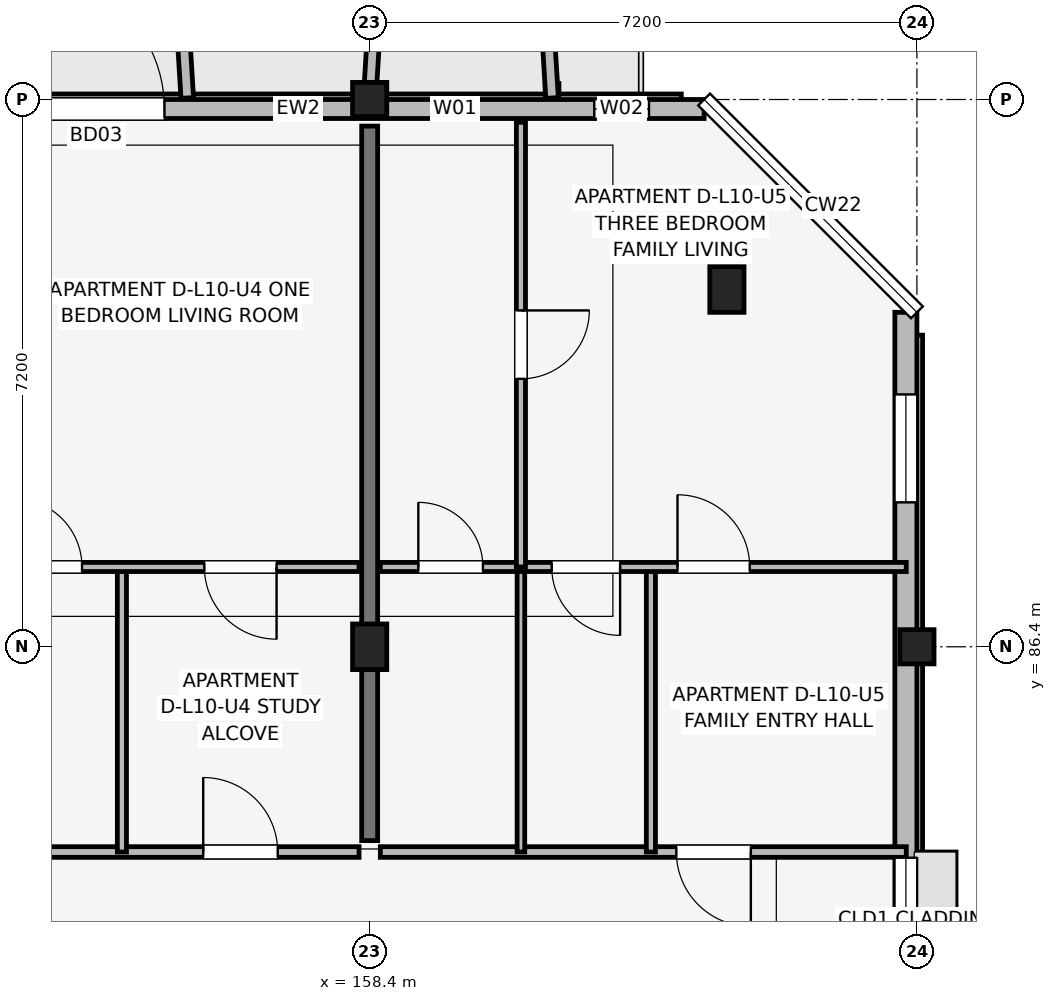
"""IFC4 building model, lengths in metres.
Left out: names, types, materials, properties, quantities, classifications, styles, units other than length and angle.
Written with IfcOpenShell. Run it as: python <this file> out.ifc"""

import sys

from ifc_helpers import new_model, si_unit, direction, frame, frame_2d, origin, origin_2d, place, context, subcontext, project, spatial, rectangle, extrude, element, fill, save


model = new_model("IFC4")
c1 = context("Model", 3, precision=1e-05, world=origin(), true_north=direction((0.0, 1.0)))
c2 = subcontext(c1, "Body", "Model", "MODEL_VIEW")
j1 = project(units=[si_unit("LENGTHUNIT", "METRE"), si_unit("PLANEANGLEUNIT", "RADIAN")], contexts=[c1])
p1 = place(None, origin())
s1 = spatial("IfcSite", under=j1, at=p1, CompositionType="ELEMENT")
p2 = place(p1, origin())
s2 = spatial("IfcBuilding", under=s1, at=p2, CompositionType="ELEMENT")
p3 = place(p2, frame((0.0, 0.0, 33.9)))
s3 = spatial("IfcBuildingStorey", under=s2, at=p3, CompositionType="ELEMENT", Elevation=33.9)
p4 = place(p3, frame((158.4, 86.4, 0.0), z_axis=(0.0, 0.0, 1.0), x_axis=(1.0, 0.0, 0.0)))
e1 = element("IfcColumn", 1, at=p4, inside=s3, PredefinedType="COLUMN", context=c2, shape_type="SweptSolid", body=[
    extrude(rectangle(XDim=0.45, YDim=0.6, at=origin_2d()), origin(), (0.0, 0.0, 1.0), 3.15),
])
for number, where, z_axis, x_axis in (
    (2, (158.4, 93.6, 0.0), (0.0, 0.0, 1.0), (1.0, 0.0, 0.0)),
    (3, (165.6, 86.4, 0.0), (0.0, 0.0, 1.0), (1.0, 0.0, 0.0)),
):
    element("IfcColumn", number, at=place(p3, frame(where, z_axis=z_axis, x_axis=x_axis)), inside=s3, PredefinedType="COLUMN", context=c2, shape_type="SweptSolid", body=[
        extrude(rectangle(XDim=0.45, YDim=0.45, at=origin_2d()), origin(), (0.0, 0.0, 1.0), 3.15),
    ])
p5 = place(p3, frame((163.1, 91.1, 0.0), z_axis=(0.0, 0.0, 1.0), x_axis=(1.0, 0.0, 0.0)))
e4 = element("IfcColumn", 4, at=p5, inside=s3, PredefinedType="COLUMN", context=c2, shape_type="SweptSolid", body=[
    extrude(rectangle(XDim=0.45, YDim=0.6, at=origin_2d()), origin(), (0.0, 0.0, 1.0), 3.15),
])
p6 = place(p3, frame((158.4, 83.85, 0.0), z_axis=(0.0, 0.0, 1.0), x_axis=(0.0, 1.0, 0.0)))
e5 = element("IfcWall", 5, at=p6, inside=s3, PredefinedType="SHEAR", context=c2, shape_type="SweptSolid", body=[
    extrude(rectangle(XDim=9.4, YDim=0.21, at=frame_2d((4.7, 0.0))), origin(), (0.0, 0.0, 1.0), 3.15),
])
p7 = place(p3, frame((165.455, 74.8, 0.0), z_axis=(0.0, 0.0, 1.0), x_axis=(0.0, 1.0, 0.0)))
e6 = element("IfcWall", 6, at=p7, inside=s3, PredefinedType="SOLIDWALL", context=c2, shape_type="SweptSolid", body=[
    extrude(rectangle(XDim=16.0, YDim=0.29, at=frame_2d((8.0, 0.0))), origin(), (0.0, 0.0, 1.0), 2.48),
])
p8 = place(p7, frame((7.175, 0.0, 1.05)))
e7 = element("IfcOpeningElement", 7, at=p8, cuts=e6, PredefinedType="OPENING", context=c2, shape_type="SweptSolid", body=[
    extrude(rectangle(XDim=1.65, YDim=1.15, at=frame_2d((0.825, 0.575))), frame((0.0, 0.155, 0.0), z_axis=(0.0, -1.0, 0.0), x_axis=(1.0, 0.0, 0.0)), (0.0, 0.0, 1.0), 0.31),
])
p9 = place(p7, frame((13.5, 0.0, 0.75)))
e8 = element("IfcOpeningElement", 8, at=p9, cuts=e6, PredefinedType="OPENING", context=c2, shape_type="SweptSolid", body=[
    extrude(rectangle(XDim=1.42, YDim=1.6, at=frame_2d((0.71, 0.8))), frame((0.0, 0.155, 0.0), z_axis=(0.0, -1.0, 0.0), x_axis=(1.0, 0.0, 0.0)), (0.0, 0.0, 1.0), 0.31),
])
p10 = place(p3, frame((162.8, 93.475, 0.0), z_axis=(0.0, 0.0, 1.0), x_axis=(-1.0, 0.0, 0.0)))
e9 = element("IfcWall", 9, at=p10, inside=s3, PredefinedType="SOLIDWALL", context=c2, shape_type="SweptSolid", body=[
    extrude(rectangle(XDim=30.4, YDim=0.25, at=frame_2d((15.2, 0.0))), origin(), (0.0, 0.0, 1.0), 2.45),
])
p11 = place(p10, frame((23.15, 0.0, 0.0), z_axis=(0.0, 0.0, 1.0), x_axis=(-1.0, 0.0, 0.0)))
e10 = element("IfcOpeningElement", 10, at=p11, cuts=e9, PredefinedType="OPENING", context=c2, shape_type="SweptSolid", body=[
    extrude(rectangle(XDim=1.5, YDim=2.15, at=frame_2d((0.75, 1.075))), frame((0.0, 0.135, 0.0), z_axis=(0.0, -1.0, 0.0), x_axis=(1.0, 0.0, 0.0)), (0.0, 0.0, 1.0), 0.27),
])
p12 = place(p10, frame((8.9, 0.0, 0.0), z_axis=(0.0, 0.0, 1.0), x_axis=(-1.0, 0.0, 0.0)))
e11 = element("IfcOpeningElement", 11, at=p12, cuts=e9, PredefinedType="OPENING", context=c2, shape_type="SweptSolid", body=[
    extrude(rectangle(XDim=1.8, YDim=2.15, at=frame_2d((0.9, 1.075))), frame((0.0, 0.135, 0.0), z_axis=(0.0, -1.0, 0.0), x_axis=(1.0, 0.0, 0.0)), (0.0, 0.0, 1.0), 0.27),
])
p13 = place(p10, frame((26.403, 0.0, 0.7)))
e12 = element("IfcOpeningElement", 12, at=p13, cuts=e9, PredefinedType="OPENING", context=c2, shape_type="SweptSolid", body=[
    extrude(rectangle(XDim=1.86, YDim=1.6, at=frame_2d((0.93, 0.8))), frame((0.0, 0.135, 0.0), z_axis=(0.0, -1.0, 0.0), x_axis=(1.0, 0.0, 0.0)), (0.0, 0.0, 1.0), 0.27),
])
p14 = place(p10, frame((16.538, 0.0, 0.7)))
e13 = element("IfcOpeningElement", 13, at=p14, cuts=e9, PredefinedType="OPENING", context=c2, shape_type="SweptSolid", body=[
    extrude(rectangle(XDim=1.86, YDim=1.6, at=frame_2d((0.93, 0.8))), frame((0.0, 0.135, 0.0), z_axis=(0.0, -1.0, 0.0), x_axis=(1.0, 0.0, 0.0)), (0.0, 0.0, 1.0), 0.27),
])
p15 = place(p10, frame((12.262, 0.0, 0.75)))
e14 = element("IfcOpeningElement", 14, at=p15, cuts=e9, PredefinedType="OPENING", context=c2, shape_type="SweptSolid", body=[
    extrude(rectangle(XDim=1.34, YDim=1.55, at=frame_2d((0.67, 0.775))), frame((0.0, 0.135, 0.0), z_axis=(0.0, -1.0, 0.0), x_axis=(1.0, 0.0, 0.0)), (0.0, 0.0, 1.0), 0.27),
])
p16 = place(p10, frame((9.748, 0.0, 0.75)))
e15 = element("IfcOpeningElement", 15, at=p16, cuts=e9, PredefinedType="OPENING", context=c2, shape_type="SweptSolid", body=[
    extrude(rectangle(XDim=1.46, YDim=1.55, at=frame_2d((0.73, 0.775))), frame((0.0, 0.135, 0.0), z_axis=(0.0, -1.0, 0.0), x_axis=(1.0, 0.0, 0.0)), (0.0, 0.0, 1.0), 0.27),
])
p17 = place(p10, frame((2.978, 0.0, 0.75)))
e16 = element("IfcOpeningElement", 16, at=p17, cuts=e9, PredefinedType="OPENING", context=c2, shape_type="SweptSolid", body=[
    extrude(rectangle(XDim=0.6, YDim=1.25, at=frame_2d((0.3, 0.625))), frame((0.0, 0.135, 0.0), z_axis=(0.0, -1.0, 0.0), x_axis=(1.0, 0.0, 0.0)), (0.0, 0.0, 1.0), 0.27),
])
p18 = place(p10, frame((0.725, 0.0, 0.75)))
e17 = element("IfcOpeningElement", 17, at=p18, cuts=e9, PredefinedType="OPENING", context=c2, shape_type="SweptSolid", body=[
    extrude(rectangle(XDim=0.72, YDim=1.35, at=frame_2d((0.36, 0.675))), frame((0.0, 0.135, 0.0), z_axis=(0.0, -1.0, 0.0), x_axis=(1.0, 0.0, 0.0)), (0.0, 0.0, 1.0), 0.27),
])
p19 = place(p3, frame((156.0, 93.62, 0.0), z_axis=(0.0, 0.0, 1.0), x_axis=(-0.061170732449, 0.998127317276, 0.0)))
e18 = element("IfcWall", 18, at=p19, inside=s3, PredefinedType="ELEMENTEDWALL", context=c2, shape_type="SweptSolid", body=[
    extrude(rectangle(XDim=1.964, YDim=0.165, at=frame_2d((0.982, 0.0))), origin(), (0.0, 0.0, 1.0), 2.45),
])
for number, where, z_axis, x_axis in (
    (19, (158.4, 93.62, 0.0), (0.0, 0.0, 1.0), (0.061, 0.998, 0.0)),
    (20, (160.8, 93.62, 0.0), (0.0, 0.0, 1.0), (-0.061, 0.998, 0.0)),
):
    element("IfcWall", number, at=place(p3, frame(where, z_axis=z_axis, x_axis=x_axis)), inside=s3, PredefinedType="ELEMENTEDWALL", context=c2, shape_type="SweptSolid", body=[
        extrude(rectangle(XDim=1.964, YDim=0.165, at=frame_2d((0.982, 0.0))), origin(), (0.0, 0.0, 1.0), 2.95),
    ])
p20 = place(p3, frame((151.34, 83.7, 0.0), z_axis=(0.0, 0.0, 1.0), x_axis=(1.0, 0.0, 0.0)))
e21 = element("IfcWall", 21, at=p20, inside=s3, PredefinedType="PARTITIONING", context=c2, shape_type="SweptSolid", body=[
    extrude(rectangle(XDim=6.92, YDim=0.14, at=frame_2d((3.46, 0.0))), origin(), (0.0, 0.0, 1.0), 2.38),
])
p21 = place(p20, frame((4.87, 0.0, 0.0)))
e22 = element("IfcOpeningElement", 22, at=p21, cuts=e21, PredefinedType="OPENING", context=c2, shape_type="SweptSolid", body=[
    extrude(rectangle(XDim=0.98, YDim=2.1, at=frame_2d((0.49, 1.05))), frame((0.0, 0.08, 0.0), z_axis=(0.0, -1.0, 0.0), x_axis=(1.0, 0.0, 0.0)), (0.0, 0.0, 1.0), 0.16),
])
p22 = place(p3, frame((155.14, 83.7, 0.0), z_axis=(0.0, 0.0, 1.0), x_axis=(0.0, 1.0, 0.0)))
e23 = element("IfcWall", 23, at=p22, inside=s3, PredefinedType="PARTITIONING", context=c2, shape_type="SweptSolid", body=[
    extrude(rectangle(XDim=3.75, YDim=0.12, at=frame_2d((1.875, 0.0))), origin(), (0.0, 0.0, 1.0), 2.38),
])
p23 = place(p3, frame((151.34, 87.45, 0.0), z_axis=(0.0, 0.0, 1.0), x_axis=(1.0, 0.0, 0.0)))
e24 = element("IfcWall", 24, at=p23, inside=s3, PredefinedType="PARTITIONING", context=c2, shape_type="SweptSolid", body=[
    extrude(rectangle(XDim=6.92, YDim=0.12, at=frame_2d((3.46, 0.0))), origin(), (0.0, 0.0, 1.0), 2.38),
])
p24 = place(p23, frame((1.35, 0.0, 0.0), z_axis=(0.0, 0.0, 1.0), x_axis=(-1.0, 0.0, 0.0)))
e25 = element("IfcOpeningElement", 25, at=p24, cuts=e24, PredefinedType="OPENING", context=c2, shape_type="SweptSolid", body=[
    extrude(rectangle(XDim=0.85, YDim=2.08, at=frame_2d((0.425, 1.04))), frame((0.0, 0.07, 0.0), z_axis=(0.0, -1.0, 0.0), x_axis=(1.0, 0.0, 0.0)), (0.0, 0.0, 1.0), 0.14),
])
p25 = place(p23, frame((2.375, 0.0, 0.0)))
e26 = element("IfcOpeningElement", 26, at=p25, cuts=e24, PredefinedType="OPENING", context=c2, shape_type="SweptSolid", body=[
    extrude(rectangle(XDim=0.9, YDim=2.08, at=frame_2d((0.45, 1.04))), frame((0.0, 0.07, 0.0), z_axis=(0.0, -1.0, 0.0), x_axis=(1.0, 0.0, 0.0)), (0.0, 0.0, 1.0), 0.14),
])
p26 = place(p23, frame((5.835, 0.0, 0.0), z_axis=(0.0, 0.0, 1.0), x_axis=(-1.0, 0.0, 0.0)))
e27 = element("IfcOpeningElement", 27, at=p26, cuts=e24, PredefinedType="OPENING", context=c2, shape_type="SweptSolid", body=[
    extrude(rectangle(XDim=0.95, YDim=2.08, at=frame_2d((0.475, 1.04))), frame((0.0, 0.07, 0.0), z_axis=(0.0, -1.0, 0.0), x_axis=(1.0, 0.0, 0.0)), (0.0, 0.0, 1.0), 0.14),
])
p27 = place(p3, frame((158.54, 83.7, 0.0), z_axis=(0.0, 0.0, 1.0), x_axis=(1.0, 0.0, 0.0)))
e28 = element("IfcWall", 28, at=p27, inside=s3, PredefinedType="PARTITIONING", context=c2, shape_type="SweptSolid", body=[
    extrude(rectangle(XDim=6.92, YDim=0.14, at=frame_2d((3.46, 0.0))), origin(), (0.0, 0.0, 1.0), 2.38),
])
p28 = place(p27, frame((4.875, 0.0, 0.0), z_axis=(0.0, 0.0, 1.0), x_axis=(-1.0, 0.0, 0.0)))
e29 = element("IfcOpeningElement", 29, at=p28, cuts=e28, PredefinedType="OPENING", context=c2, shape_type="SweptSolid", body=[
    extrude(rectangle(XDim=0.98, YDim=2.1, at=frame_2d((0.49, 1.05))), frame((0.0, 0.08, 0.0), z_axis=(0.0, -1.0, 0.0), x_axis=(1.0, 0.0, 0.0)), (0.0, 0.0, 1.0), 0.16),
])
p29 = place(p3, frame((160.39, 83.7, 0.0), z_axis=(0.0, 0.0, 1.0), x_axis=(0.0, 1.0, 0.0)))
e30 = element("IfcWall", 30, at=p29, inside=s3, PredefinedType="PARTITIONING", context=c2, shape_type="SweptSolid", body=[
    extrude(rectangle(XDim=3.75, YDim=0.1, at=frame_2d((1.875, 0.0))), origin(), (0.0, 0.0, 1.0), 2.38),
])
p30 = place(p3, frame((162.1, 83.7, 0.0), z_axis=(0.0, 0.0, 1.0), x_axis=(0.0, 1.0, 0.0)))
e31 = element("IfcWall", 31, at=p30, inside=s3, PredefinedType="PARTITIONING", context=c2, shape_type="SweptSolid", body=[
    extrude(rectangle(XDim=3.75, YDim=0.12, at=frame_2d((1.875, 0.0))), origin(), (0.0, 0.0, 1.0), 2.38),
])
p31 = place(p3, frame((158.54, 87.45, 0.0), z_axis=(0.0, 0.0, 1.0), x_axis=(1.0, 0.0, 0.0)))
e32 = element("IfcWall", 32, at=p31, inside=s3, PredefinedType="PARTITIONING", context=c2, shape_type="SweptSolid", body=[
    extrude(rectangle(XDim=6.92, YDim=0.12, at=frame_2d((3.46, 0.0))), origin(), (0.0, 0.0, 1.0), 2.38),
])
p32 = place(p31, frame((0.5, 0.0, 0.0)))
e33 = element("IfcOpeningElement", 33, at=p32, cuts=e32, PredefinedType="OPENING", context=c2, shape_type="SweptSolid", body=[
    extrude(rectangle(XDim=0.85, YDim=2.08, at=frame_2d((0.425, 1.04))), frame((0.0, 0.07, 0.0), z_axis=(0.0, -1.0, 0.0), x_axis=(1.0, 0.0, 0.0)), (0.0, 0.0, 1.0), 0.14),
])
p33 = place(p31, frame((3.155, 0.0, 0.0), z_axis=(0.0, 0.0, 1.0), x_axis=(-1.0, 0.0, 0.0)))
e34 = element("IfcOpeningElement", 34, at=p33, cuts=e32, PredefinedType="OPENING", context=c2, shape_type="SweptSolid", body=[
    extrude(rectangle(XDim=0.9, YDim=2.08, at=frame_2d((0.45, 1.04))), frame((0.0, 0.07, 0.0), z_axis=(0.0, -1.0, 0.0), x_axis=(1.0, 0.0, 0.0)), (0.0, 0.0, 1.0), 0.14),
])
p34 = place(p31, frame((3.91, 0.0, 0.0)))
e35 = element("IfcOpeningElement", 35, at=p34, cuts=e32, PredefinedType="OPENING", context=c2, shape_type="SweptSolid", body=[
    extrude(rectangle(XDim=0.95, YDim=2.08, at=frame_2d((0.475, 1.04))), frame((0.0, 0.07, 0.0), z_axis=(0.0, -1.0, 0.0), x_axis=(1.0, 0.0, 0.0)), (0.0, 0.0, 1.0), 0.14),
])
p35 = place(p3, frame((160.39, 87.45, 0.0), z_axis=(0.0, 0.0, 1.0), x_axis=(0.0, 1.0, 0.0)))
e36 = element("IfcWall", 36, at=p35, inside=s3, PredefinedType="PARTITIONING", context=c2, shape_type="SweptSolid", body=[
    extrude(rectangle(XDim=5.85, YDim=0.12, at=frame_2d((2.925, 0.0))), origin(), (0.0, 0.0, 1.0), 2.38),
])
p36 = place(p35, frame((3.375, 0.0, 0.0), z_axis=(0.0, 0.0, 1.0), x_axis=(-1.0, 0.0, 0.0)))
e37 = element("IfcOpeningElement", 37, at=p36, cuts=e36, PredefinedType="OPENING", context=c2, shape_type="SweptSolid", body=[
    extrude(rectangle(XDim=0.9, YDim=2.08, at=frame_2d((0.45, 1.04))), frame((0.0, 0.07, 0.0), z_axis=(0.0, -1.0, 0.0), x_axis=(1.0, 0.0, 0.0)), (0.0, 0.0, 1.0), 0.14),
])
p37 = place(p12, origin())
e38 = element("IfcDoor", 38, at=p37, inside=s3, OperationType="SINGLE_SWING_RIGHT", PredefinedType="DOOR", context=c2, shape_type="SweptSolid", body=[
    extrude(rectangle(XDim=1.8, YDim=2.15, at=frame_2d((0.9, 1.075))), frame((0.0, 0.025, 0.0), z_axis=(0.0, -1.0, 0.0), x_axis=(1.0, 0.0, 0.0)), (0.0, 0.0, 1.0), 0.05),
])
fill(e11, e38)
p38 = place(p17, origin())
e39 = element("IfcWindow", 39, at=p38, inside=s3, PartitioningType="SINGLE_PANEL", PredefinedType="WINDOW", context=c2, shape_type="SweptSolid", body=[
    extrude(rectangle(XDim=0.6, YDim=1.25, at=frame_2d((0.3, 0.625))), frame((0.0, 0.03, 0.0), z_axis=(0.0, -1.0, 0.0), x_axis=(1.0, 0.0, 0.0)), (0.0, 0.0, 1.0), 0.06),
])
fill(e16, e39)
p39 = place(p18, origin())
e40 = element("IfcWindow", 40, at=p39, inside=s3, PartitioningType="SINGLE_PANEL", PredefinedType="WINDOW", context=c2, shape_type="SweptSolid", body=[
    extrude(rectangle(XDim=0.72, YDim=1.35, at=frame_2d((0.36, 0.675))), frame((0.0, 0.03, 0.0), z_axis=(0.0, -1.0, 0.0), x_axis=(1.0, 0.0, 0.0)), (0.0, 0.0, 1.0), 0.06),
])
fill(e17, e40)
p40 = place(p8, origin())
e41 = element("IfcWindow", 41, at=p40, inside=s3, PartitioningType="SINGLE_PANEL", PredefinedType="WINDOW", context=c2, shape_type="SweptSolid", body=[
    extrude(rectangle(XDim=1.65, YDim=1.15, at=frame_2d((0.825, 0.575))), frame((0.0, 0.03, 0.0), z_axis=(0.0, -1.0, 0.0), x_axis=(1.0, 0.0, 0.0)), (0.0, 0.0, 1.0), 0.06),
])
fill(e7, e41)
p41 = place(p9, origin())
e42 = element("IfcWindow", 42, at=p41, inside=s3, PartitioningType="SINGLE_PANEL", PredefinedType="WINDOW", context=c2, shape_type="SweptSolid", body=[
    extrude(rectangle(XDim=1.42, YDim=1.6, at=frame_2d((0.71, 0.8))), frame((0.0, 0.03, 0.0), z_axis=(0.0, -1.0, 0.0), x_axis=(1.0, 0.0, 0.0)), (0.0, 0.0, 1.0), 0.06),
])
fill(e8, e42)
p42 = place(p21, origin())
e43 = element("IfcDoor", 43, at=p42, inside=s3, OperationType="SINGLE_SWING_LEFT", PredefinedType="DOOR", context=c2, shape_type="SweptSolid", body=[
    extrude(rectangle(XDim=0.98, YDim=2.1, at=frame_2d((0.49, 1.05))), frame((0.0, 0.025, 0.0), z_axis=(0.0, -1.0, 0.0), x_axis=(1.0, 0.0, 0.0)), (0.0, 0.0, 1.0), 0.05),
])
fill(e22, e43)
p43 = place(p25, origin())
e44 = element("IfcDoor", 44, at=p43, inside=s3, OperationType="SINGLE_SWING_LEFT", PredefinedType="DOOR", context=c2, shape_type="SweptSolid", body=[
    extrude(rectangle(XDim=0.9, YDim=2.08, at=frame_2d((0.45, 1.04))), frame((0.0, 0.025, 0.0), z_axis=(0.0, -1.0, 0.0), x_axis=(1.0, 0.0, 0.0)), (0.0, 0.0, 1.0), 0.05),
])
fill(e26, e44)
p44 = place(p26, origin())
e45 = element("IfcDoor", 45, at=p44, inside=s3, OperationType="SINGLE_SWING_RIGHT", PredefinedType="DOOR", context=c2, shape_type="SweptSolid", body=[
    extrude(rectangle(XDim=0.95, YDim=2.08, at=frame_2d((0.475, 1.04))), frame((0.0, 0.025, 0.0), z_axis=(0.0, -1.0, 0.0), x_axis=(1.0, 0.0, 0.0)), (0.0, 0.0, 1.0), 0.05),
])
fill(e27, e45)
p45 = place(p28, origin())
e46 = element("IfcDoor", 46, at=p45, inside=s3, OperationType="SINGLE_SWING_RIGHT", PredefinedType="DOOR", context=c2, shape_type="SweptSolid", body=[
    extrude(rectangle(XDim=0.98, YDim=2.1, at=frame_2d((0.49, 1.05))), frame((0.0, 0.025, 0.0), z_axis=(0.0, -1.0, 0.0), x_axis=(1.0, 0.0, 0.0)), (0.0, 0.0, 1.0), 0.05),
])
fill(e29, e46)
p46 = place(p32, origin())
e47 = element("IfcDoor", 47, at=p46, inside=s3, OperationType="SINGLE_SWING_LEFT", PredefinedType="DOOR", context=c2, shape_type="SweptSolid", body=[
    extrude(rectangle(XDim=0.85, YDim=2.08, at=frame_2d((0.425, 1.04))), frame((0.0, 0.025, 0.0), z_axis=(0.0, -1.0, 0.0), x_axis=(1.0, 0.0, 0.0)), (0.0, 0.0, 1.0), 0.05),
])
fill(e33, e47)
p47 = place(p33, origin())
e48 = element("IfcDoor", 48, at=p47, inside=s3, OperationType="SINGLE_SWING_RIGHT", PredefinedType="DOOR", context=c2, shape_type="SweptSolid", body=[
    extrude(rectangle(XDim=0.9, YDim=2.08, at=frame_2d((0.45, 1.04))), frame((0.0, 0.025, 0.0), z_axis=(0.0, -1.0, 0.0), x_axis=(1.0, 0.0, 0.0)), (0.0, 0.0, 1.0), 0.05),
])
fill(e34, e48)
p48 = place(p34, origin())
e49 = element("IfcDoor", 49, at=p48, inside=s3, OperationType="SINGLE_SWING_LEFT", PredefinedType="DOOR", context=c2, shape_type="SweptSolid", body=[
    extrude(rectangle(XDim=0.95, YDim=2.08, at=frame_2d((0.475, 1.04))), frame((0.0, 0.025, 0.0), z_axis=(0.0, -1.0, 0.0), x_axis=(1.0, 0.0, 0.0)), (0.0, 0.0, 1.0), 0.05),
])
fill(e35, e49)
p49 = place(p36, origin())
e50 = element("IfcDoor", 50, at=p49, inside=s3, OperationType="SINGLE_SWING_RIGHT", PredefinedType="DOOR", context=c2, shape_type="SweptSolid", body=[
    extrude(rectangle(XDim=0.9, YDim=2.08, at=frame_2d((0.45, 1.04))), frame((0.0, 0.025, 0.0), z_axis=(0.0, -1.0, 0.0), x_axis=(1.0, 0.0, 0.0)), (0.0, 0.0, 1.0), 0.05),
])
fill(e37, e50)
save(model, sys.argv[1])
